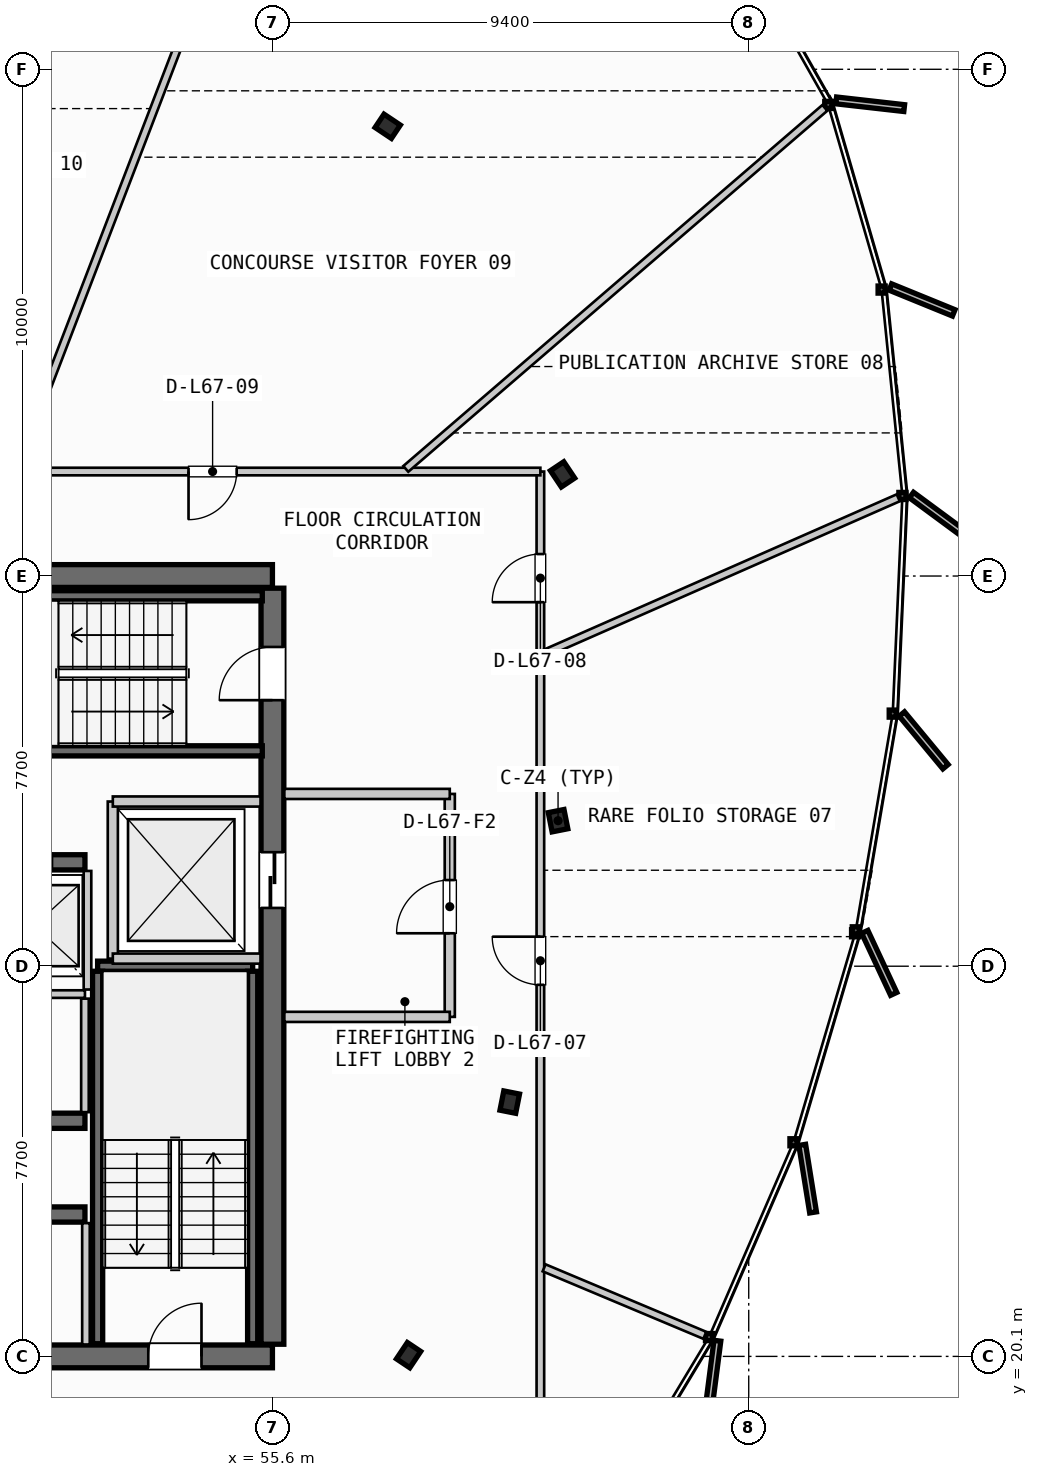
"""IFC4 building model, lengths in metres.
Left out: names, types, materials, properties, quantities, classifications, styles, units other than length and angle.
Written with IfcOpenShell. Run it as: python <this file> out.ifc"""

import sys

from ifc_helpers import new_model, si_unit, direction, frame, frame_2d, origin, origin_2d, place, context, subcontext, project, spatial, rectangle, i_section, extrude, source, transform, mapped, element, fill, save


model = new_model("IFC4")
c1 = context("Model", 3, precision=1e-05, world=origin(), true_north=direction((0.0, 1.0)))
c2 = subcontext(c1, "Body", "Model", "MODEL_VIEW")
j1 = project(units=[si_unit("LENGTHUNIT", "METRE"), si_unit("PLANEANGLEUNIT", "RADIAN")], contexts=[c1])
p1 = place(None, origin())
s1 = spatial("IfcSite", under=j1, at=p1, CompositionType="ELEMENT")
p2 = place(p1, origin())
s2 = spatial("IfcBuilding", under=s1, at=p2, CompositionType="ELEMENT")
p3 = place(p2, frame((0.0, 0.0, 256.0)))
s3 = spatial("IfcBuildingStorey", under=s2, at=p3, CompositionType="ELEMENT", Elevation=256.0)
p4 = place(p3, frame((38.0, 20.1, 0.0), z_axis=(0.0, 0.0, 1.0), x_axis=(1.0, 0.0, 0.0)))
e1 = element("IfcWall", 1, at=p4, inside=s3, PredefinedType="SHEAR", context=c2, shape_type="SweptSolid", body=[
    extrude(rectangle(XDim=17.6, YDim=0.45, at=frame_2d((8.8, 0.0))), origin(), (0.0, 0.0, 1.0), 3.21),
])
p5 = place(p4, frame((1.4, 0.0, 0.0)))
e2 = element("IfcOpeningElement", 2, at=p5, cuts=e1, PredefinedType="OPENING", context=c2, shape_type="SweptSolid", body=[
    extrude(rectangle(XDim=1.05, YDim=2.15, at=frame_2d((0.525, 1.075))), frame((0.0, 0.235, 0.0), z_axis=(0.0, -1.0, 0.0), x_axis=(1.0, 0.0, 0.0)), (0.0, 0.0, 1.0), 0.47),
])
p6 = place(p4, frame((15.15, 0.0, 0.0)))
e3 = element("IfcOpeningElement", 3, at=p6, cuts=e1, PredefinedType="OPENING", context=c2, shape_type="SweptSolid", body=[
    extrude(rectangle(XDim=1.05, YDim=2.15, at=frame_2d((0.525, 1.075))), frame((0.0, 0.235, 0.0), z_axis=(0.0, -1.0, 0.0), x_axis=(1.0, 0.0, 0.0)), (0.0, 0.0, 1.0), 0.47),
])
p7 = place(p4, frame((5.25, 0.0, 0.0)))
e4 = element("IfcOpeningElement", 4, at=p7, cuts=e1, PredefinedType="OPENING", context=c2, shape_type="SweptSolid", body=[
    extrude(rectangle(XDim=0.95, YDim=2.15, at=frame_2d((0.475, 1.075))), frame((0.0, 0.235, 0.0), z_axis=(0.0, -1.0, 0.0), x_axis=(1.0, 0.0, 0.0)), (0.0, 0.0, 1.0), 0.47),
])
p8 = place(p4, frame((11.4, 0.0, 0.0)))
e5 = element("IfcOpeningElement", 5, at=p8, cuts=e1, PredefinedType="OPENING", context=c2, shape_type="SweptSolid", body=[
    extrude(rectangle(XDim=0.95, YDim=2.15, at=frame_2d((0.475, 1.075))), frame((0.0, 0.235, 0.0), z_axis=(0.0, -1.0, 0.0), x_axis=(1.0, 0.0, 0.0)), (0.0, 0.0, 1.0), 0.47),
])
p9 = place(p3, frame((55.6, 35.5, 0.0), z_axis=(0.0, 0.0, 1.0), x_axis=(-1.0, 0.0, 0.0)))
e6 = element("IfcWall", 6, at=p9, inside=s3, PredefinedType="SHEAR", context=c2, shape_type="SweptSolid", body=[
    extrude(rectangle(XDim=17.6, YDim=0.45, at=frame_2d((8.8, 0.0))), origin(), (0.0, 0.0, 1.0), 3.21),
])
p10 = place(p9, frame((8.05, 0.0, 0.0)))
e7 = element("IfcOpeningElement", 7, at=p10, cuts=e6, PredefinedType="OPENING", context=c2, shape_type="SweptSolid", body=[
    extrude(rectangle(XDim=1.5, YDim=2.2, at=frame_2d((0.75, 1.1))), frame((0.0, 0.235, 0.0), z_axis=(0.0, -1.0, 0.0), x_axis=(1.0, 0.0, 0.0)), (0.0, 0.0, 1.0), 0.47),
])
p11 = place(p9, frame((15.85, 0.0, 0.0)))
e8 = element("IfcOpeningElement", 8, at=p11, cuts=e6, PredefinedType="OPENING", context=c2, shape_type="SweptSolid", body=[
    extrude(rectangle(XDim=0.85, YDim=2.15, at=frame_2d((0.425, 1.075))), frame((0.0, 0.235, 0.0), z_axis=(0.0, -1.0, 0.0), x_axis=(1.0, 0.0, 0.0)), (0.0, 0.0, 1.0), 0.47),
])
p12 = place(p9, frame((14.35, 0.0, 0.0)))
e9 = element("IfcOpeningElement", 9, at=p12, cuts=e6, PredefinedType="OPENING", context=c2, shape_type="SweptSolid", body=[
    extrude(rectangle(XDim=0.85, YDim=2.15, at=frame_2d((0.425, 1.075))), frame((0.0, 0.235, 0.0), z_axis=(0.0, -1.0, 0.0), x_axis=(1.0, 0.0, 0.0)), (0.0, 0.0, 1.0), 0.47),
])
p13 = place(p9, frame((12.3, 0.0, 0.0)))
e10 = element("IfcOpeningElement", 10, at=p13, cuts=e6, PredefinedType="OPENING", context=c2, shape_type="SweptSolid", body=[
    extrude(rectangle(XDim=0.95, YDim=2.15, at=frame_2d((0.475, 1.075))), frame((0.0, 0.235, 0.0), z_axis=(0.0, -1.0, 0.0), x_axis=(1.0, 0.0, 0.0)), (0.0, 0.0, 1.0), 0.47),
])
p14 = place(p9, frame((10.2, 0.0, 0.0)))
e11 = element("IfcOpeningElement", 11, at=p14, cuts=e6, PredefinedType="OPENING", context=c2, shape_type="SweptSolid", body=[
    extrude(rectangle(XDim=0.9, YDim=2.15, at=frame_2d((0.45, 1.075))), frame((0.0, 0.235, 0.0), z_axis=(0.0, -1.0, 0.0), x_axis=(1.0, 0.0, 0.0)), (0.0, 0.0, 1.0), 0.47),
])
p15 = place(p3, frame((55.6, 20.34, 0.0), z_axis=(0.0, 0.0, 1.0), x_axis=(0.0, 1.0, 0.0)))
e12 = element("IfcWall", 12, at=p15, inside=s3, PredefinedType="SHEAR", context=c2, shape_type="SweptSolid", body=[
    extrude(rectangle(XDim=14.92, YDim=0.45, at=frame_2d((7.46, 0.0))), origin(), (0.0, 0.0, 1.0), 3.21),
])
p16 = place(p15, frame((12.71, 0.0, 0.0)))
e13 = element("IfcOpeningElement", 13, at=p16, cuts=e12, PredefinedType="OPENING", context=c2, shape_type="SweptSolid", body=[
    extrude(rectangle(XDim=1.05, YDim=2.15, at=frame_2d((0.525, 1.075))), frame((0.0, 0.235, 0.0), z_axis=(0.0, -1.0, 0.0), x_axis=(1.0, 0.0, 0.0)), (0.0, 0.0, 1.0), 0.47),
])
p17 = place(p15, frame((8.61, 0.0, 0.0)))
e14 = element("IfcOpeningElement", 14, at=p17, cuts=e12, PredefinedType="OPENING", context=c2, shape_type="SweptSolid", body=[
    extrude(rectangle(XDim=1.1, YDim=2.2, at=frame_2d((0.55, 1.1))), frame((0.0, 0.235, 0.0), z_axis=(0.0, -1.0, 0.0), x_axis=(1.0, 0.0, 0.0)), (0.0, 0.0, 1.0), 0.47),
])
p18 = place(p3, frame((47.65, 22.9, 0.0), z_axis=(0.0, 0.0, 1.0), x_axis=(1.0, 0.0, 0.0)))
e15 = element("IfcWall", 15, at=p18, inside=s3, PredefinedType="SHEAR", context=c2, shape_type="SweptSolid", body=[
    extrude(rectangle(XDim=4.25, YDim=0.3, at=frame_2d((2.125, 0.0))), origin(), (0.0, 0.0, 1.0), 3.21),
])
p19 = place(p3, frame((47.65, 24.75, 0.0), z_axis=(0.0, 0.0, 1.0), x_axis=(1.0, 0.0, 0.0)))
e16 = element("IfcWall", 16, at=p19, inside=s3, PredefinedType="SHEAR", context=c2, shape_type="SweptSolid", body=[
    extrude(rectangle(XDim=4.25, YDim=0.3, at=frame_2d((2.125, 0.0))), origin(), (0.0, 0.0, 1.0), 3.21),
])
p20 = place(p19, frame((1.55, 0.0, 0.0)))
e17 = element("IfcOpeningElement", 17, at=p20, cuts=e16, PredefinedType="OPENING", context=c2, shape_type="SweptSolid", body=[
    extrude(rectangle(XDim=0.95, YDim=2.15, at=frame_2d((0.475, 1.075))), frame((0.0, 0.16, 0.0), z_axis=(0.0, -1.0, 0.0), x_axis=(1.0, 0.0, 0.0)), (0.0, 0.0, 1.0), 0.32),
])
p21 = place(p3, frame((47.65, 29.85, 0.0), z_axis=(0.0, 0.0, 1.0), x_axis=(1.0, 0.0, 0.0)))
e18 = element("IfcWall", 18, at=p21, inside=s3, PredefinedType="SHEAR", context=c2, shape_type="SweptSolid", body=[
    extrude(rectangle(XDim=4.25, YDim=0.3, at=frame_2d((2.125, 0.0))), origin(), (0.0, 0.0, 1.0), 3.21),
])
p22 = place(p21, frame((0.45, 0.0, 0.0)))
e19 = element("IfcOpeningElement", 19, at=p22, cuts=e18, PredefinedType="OPENING", context=c2, shape_type="SweptSolid", body=[
    extrude(rectangle(XDim=1.1, YDim=2.2, at=frame_2d((0.55, 1.1))), frame((0.0, 0.16, 0.0), z_axis=(0.0, -1.0, 0.0), x_axis=(1.0, 0.0, 0.0)), (0.0, 0.0, 1.0), 0.32),
])
p23 = place(p21, frame((2.5, 0.0, 0.0)))
e20 = element("IfcOpeningElement", 20, at=p23, cuts=e18, PredefinedType="OPENING", context=c2, shape_type="SweptSolid", body=[
    extrude(rectangle(XDim=1.1, YDim=2.2, at=frame_2d((0.55, 1.1))), frame((0.0, 0.16, 0.0), z_axis=(0.0, -1.0, 0.0), x_axis=(1.0, 0.0, 0.0)), (0.0, 0.0, 1.0), 0.32),
])
m1 = source(origin(), c2, "Body", "SweptSolid", [
    extrude(i_section(OverallWidth=0.387, OverallDepth=0.316, WebThickness=0.019, FlangeThickness=0.028, FilletRadius=0.015, at=origin_2d()), origin(), (0.0, 0.0, 1.0), 3.21),
])
for number, where, z_axis, x_axis in (
    (21, (61.237, 30.672, 0.0), (0.0, 0.0, 1.0), (0.981, 0.195, 0.0)),
    (22, (61.326, 37.506, 0.0), (0.0, 0.0, 1.0), (0.831, 0.556, 0.0)),
    (23, (57.875, 44.375, 0.0), (0.0, 0.0, 1.0), (0.556, 0.831, 0.0)),
    (24, (58.287, 20.125, 0.0), (0.0, 0.0, 1.0), (0.831, -0.556, 0.0)),
    (25, (60.284, 25.118, 0.0), (0.0, 0.0, 1.0), (0.981, -0.195, 0.0)),
):
    element("IfcColumn", number, at=place(p3, frame(where, z_axis=z_axis, x_axis=x_axis)), inside=s3, PredefinedType="COLUMN", context=c2, shape_type="MappedRepresentation", body=[
        mapped(m1, transform((0.0, 0.0, 0.0), scale=1.0)),
    ])
p24 = place(p3, frame((52.15, 27.8, 0.0), z_axis=(0.0, 0.0, 1.0), x_axis=(1.0, 0.0, 0.0)))
e26 = element("IfcWall", 26, at=p24, inside=s3, PredefinedType="SHEAR", context=c2, shape_type="SweptSolid", body=[
    extrude(rectangle(XDim=3.06, YDim=0.2, at=frame_2d((1.53, 0.0))), origin(), (0.0, 0.0, 1.0), 3.21),
])
for number, where, z_axis, x_axis in (
    (27, (55.21, 27.7, 0.0), (0.0, 0.0, 1.0), (0.0, -1.0, 0.0)),
    (28, (52.15, 20.35, 0.0), (0.0, 0.0, 1.0), (0.0, 1.0, 0.0)),
    (29, (48.05, 35.11, 0.0), (0.0, 0.0, 1.0), (1.0, 0.0, 0.0)),
    (30, (55.4, 32.05, 0.0), (0.0, 0.0, 1.0), (-1.0, 0.0, 0.0)),
):
    element("IfcWall", number, at=place(p3, frame(where, z_axis=z_axis, x_axis=x_axis)), inside=s3, PredefinedType="SHEAR", context=c2, shape_type="SweptSolid", body=[
        extrude(rectangle(XDim=7.35, YDim=0.2, at=frame_2d((3.675, 0.0))), origin(), (0.0, 0.0, 1.0), 3.21),
    ])
p25 = place(p3, frame((52.45, 27.95, 0.0), z_axis=(0.0, 0.0, 1.0), x_axis=(0.0, 1.0, 0.0)))
e31 = element("IfcWall", 31, at=p25, inside=s3, PredefinedType="PARTITIONING", context=c2, shape_type="SweptSolid", body=[
    extrude(rectangle(XDim=3.1, YDim=0.2, at=frame_2d((1.55, 0.0))), origin(), (0.0, 0.0, 1.0), 2.28),
])
for number, where, z_axis, x_axis in (
    (32, (52.45, 27.95, 0.0), (0.0, 0.0, 1.0), (1.0, 0.0, 0.0)),
    (33, (52.45, 31.05, 0.0), (0.0, 0.0, 1.0), (1.0, 0.0, 0.0)),
):
    element("IfcWall", number, at=place(p3, frame(where, z_axis=z_axis, x_axis=x_axis)), inside=s3, PredefinedType="PARTITIONING", context=c2, shape_type="SweptSolid", body=[
        extrude(rectangle(XDim=2.915, YDim=0.2, at=frame_2d((1.458, 0.0))), origin(), (0.0, 0.0, 1.0), 2.28),
    ])
p26 = place(p3, frame((59.1, 26.8, 0.0), z_axis=(0.0, 0.0, 1.0), x_axis=(0.0, 1.0, 0.0)))
e34 = element("IfcWall", 34, at=p26, inside=s3, PredefinedType="PARTITIONING", context=c2, shape_type="SweptSolid", body=[
    extrude(rectangle(XDim=4.4, YDim=0.2, at=frame_2d((2.2, 0.0))), origin(), (0.0, 0.0, 1.0), 2.28),
])
p27 = place(p26, frame((1.65, 0.0, 0.0)))
e35 = element("IfcOpeningElement", 35, at=p27, cuts=e34, PredefinedType="OPENING", context=c2, shape_type="SweptSolid", body=[
    extrude(rectangle(XDim=1.05, YDim=2.15, at=frame_2d((0.525, 1.075))), frame((0.0, 0.11, 0.0), z_axis=(0.0, -1.0, 0.0), x_axis=(1.0, 0.0, 0.0)), (0.0, 0.0, 1.0), 0.22),
])
for number, where, z_axis, x_axis in (
    (36, (55.835, 26.8, 0.0), (0.0, 0.0, 1.0), (1.0, 0.0, 0.0)),
    (37, (55.835, 31.2, 0.0), (0.0, 0.0, 1.0), (1.0, 0.0, 0.0)),
):
    element("IfcWall", number, at=place(p3, frame(where, z_axis=z_axis, x_axis=x_axis)), inside=s3, PredefinedType="PARTITIONING", context=c2, shape_type="SweptSolid", body=[
        extrude(rectangle(XDim=3.265, YDim=0.2, at=frame_2d((1.633, 0.0))), origin(), (0.0, 0.0, 1.0), 2.28),
    ])
p28 = place(p3, frame((51.92, 20.335, 0.0), z_axis=(0.0, 0.0, 1.0), x_axis=(0.0, 1.0, 0.0)))
e38 = element("IfcWall", 38, at=p28, inside=s3, PredefinedType="PARTITIONING", context=c2, shape_type="SweptSolid", body=[
    extrude(rectangle(XDim=2.395, YDim=0.15, at=frame_2d((1.198, 0.0))), origin(), (0.0, 0.0, 1.0), 2.28),
])
p29 = place(p3, frame((47.65, 27.25, 0.0), z_axis=(0.0, 0.0, 1.0), x_axis=(1.0, 0.0, 0.0)))
e39 = element("IfcWall", 39, at=p29, inside=s3, PredefinedType="PARTITIONING", context=c2, shape_type="SweptSolid", body=[
    extrude(rectangle(XDim=4.25, YDim=0.15, at=frame_2d((2.125, 0.0))), origin(), (0.0, 0.0, 1.0), 2.28),
])
p30 = place(p3, frame((51.9, 24.92, 0.0), z_axis=(0.0, 0.0, 1.0), x_axis=(0.0, 1.0, 0.0)))
e40 = element("IfcWall", 40, at=p30, inside=s3, PredefinedType="PARTITIONING", context=c2, shape_type="SweptSolid", body=[
    extrude(rectangle(XDim=2.24, YDim=0.15, at=frame_2d((1.12, 0.0))), origin(), (0.0, 0.0, 1.0), 2.28),
])
p31 = place(p3, frame((51.95, 27.34, 0.0), z_axis=(0.0, 0.0, 1.0), x_axis=(0.0, 1.0, 0.0)))
e41 = element("IfcWall", 41, at=p31, inside=s3, PredefinedType="PARTITIONING", context=c2, shape_type="SweptSolid", body=[
    extrude(rectangle(XDim=2.34, YDim=0.15, at=frame_2d((1.17, 0.0))), origin(), (0.0, 0.0, 1.0), 2.28),
])
p32 = place(p3, frame((60.888, 18.269, 0.0), z_axis=(0.0, 0.0, 1.0), x_axis=(0.0, 1.0, 0.0)))
e42 = element("IfcWall", 42, at=p32, inside=s3, PredefinedType="PARTITIONING", context=c2, shape_type="SweptSolid", body=[
    extrude(rectangle(XDim=19.293, YDim=0.15, at=frame_2d((9.646, 0.0))), origin(), (0.0, 0.0, 1.0), 2.28),
])
p33 = place(p32, frame((9.164, 0.0, 0.0)))
e43 = element("IfcOpeningElement", 43, at=p33, cuts=e42, PredefinedType="OPENING", context=c2, shape_type="SweptSolid", body=[
    extrude(rectangle(XDim=0.95, YDim=2.15, at=frame_2d((0.475, 1.075))), frame((0.0, 0.085, 0.0), z_axis=(0.0, -1.0, 0.0), x_axis=(1.0, 0.0, 0.0)), (0.0, 0.0, 1.0), 0.17),
])
p34 = place(p32, frame((16.715, 0.0, 0.0)))
e44 = element("IfcOpeningElement", 44, at=p34, cuts=e42, PredefinedType="OPENING", context=c2, shape_type="SweptSolid", body=[
    extrude(rectangle(XDim=0.95, YDim=2.15, at=frame_2d((0.475, 1.075))), frame((0.0, 0.085, 0.0), z_axis=(0.0, -1.0, 0.0), x_axis=(1.0, 0.0, 0.0)), (0.0, 0.0, 1.0), 0.17),
])
p35 = place(p3, frame((60.888, 37.562, 0.0), z_axis=(0.0, 0.0, 1.0), x_axis=(-1.0, 0.0, 0.0)))
e45 = element("IfcWall", 45, at=p35, inside=s3, PredefinedType="PARTITIONING", context=c2, shape_type="SweptSolid", body=[
    extrude(rectangle(XDim=28.038, YDim=0.15, at=frame_2d((14.019, 0.0))), origin(), (0.0, 0.0, 1.0), 2.28),
])
p36 = place(p35, frame((5.994, 0.0, 0.0)))
e46 = element("IfcOpeningElement", 46, at=p36, cuts=e45, PredefinedType="OPENING", context=c2, shape_type="SweptSolid", body=[
    extrude(rectangle(XDim=0.95, YDim=2.15, at=frame_2d((0.475, 1.075))), frame((0.0, 0.085, 0.0), z_axis=(0.0, -1.0, 0.0), x_axis=(1.0, 0.0, 0.0)), (0.0, 0.0, 1.0), 0.17),
])
p37 = place(p35, frame((12.306, 0.0, 0.0)))
e47 = element("IfcOpeningElement", 47, at=p37, cuts=e45, PredefinedType="OPENING", context=c2, shape_type="SweptSolid", body=[
    extrude(rectangle(XDim=0.95, YDim=2.15, at=frame_2d((0.475, 1.075))), frame((0.0, 0.085, 0.0), z_axis=(0.0, -1.0, 0.0), x_axis=(1.0, 0.0, 0.0)), (0.0, 0.0, 1.0), 0.17),
])
p38 = place(p35, frame((20.858, 0.0, 0.0)))
e48 = element("IfcOpeningElement", 48, at=p38, cuts=e45, PredefinedType="OPENING", context=c2, shape_type="SweptSolid", body=[
    extrude(rectangle(XDim=0.95, YDim=2.15, at=frame_2d((0.475, 1.075))), frame((0.0, 0.085, 0.0), z_axis=(0.0, -1.0, 0.0), x_axis=(1.0, 0.0, 0.0)), (0.0, 0.0, 1.0), 0.17),
])
p39 = place(p3, frame((60.962, 21.848, 0.0), z_axis=(0.0, 0.0, 1.0), x_axis=(0.921987679929, -0.387219211892, 0.0)))
e49 = element("IfcWall", 49, at=p39, inside=s3, PredefinedType="PARTITIONING", context=c2, shape_type="SweptSolid", body=[
    extrude(rectangle(XDim=3.44, YDim=0.15, at=frame_2d((1.72, 0.0))), origin(), (0.0, 0.0, 1.0), 2.28),
])
p40 = place(p3, frame((60.961, 33.967, 0.0), z_axis=(0.0, 0.0, 1.0), x_axis=(0.915265056404, 0.402852177015, 0.0)))
e50 = element("IfcWall", 50, at=p40, inside=s3, PredefinedType="PARTITIONING", context=c2, shape_type="SweptSolid", body=[
    extrude(rectangle(XDim=7.636, YDim=0.15, at=frame_2d((3.818, 0.0))), origin(), (0.0, 0.0, 1.0), 2.28),
])
p41 = place(p3, frame((58.232, 37.614, 0.0), z_axis=(0.0, 0.0, 1.0), x_axis=(0.757629619608, 0.652684732081, 0.0)))
e51 = element("IfcWall", 51, at=p41, inside=s3, PredefinedType="PARTITIONING", context=c2, shape_type="SweptSolid", body=[
    extrude(rectangle(XDim=10.915, YDim=0.15, at=frame_2d((5.458, 0.0))), origin(), (0.0, 0.0, 1.0), 2.28),
])
p42 = place(p3, frame((50.546, 37.637, 0.0), z_axis=(0.0, 0.0, 1.0), x_axis=(0.35830718527, 0.933603749448, 0.0)))
e52 = element("IfcWall", 52, at=p42, inside=s3, PredefinedType="PARTITIONING", context=c2, shape_type="SweptSolid", body=[
    extrude(rectangle(XDim=15.464, YDim=0.15, at=frame_2d((7.732, 0.0))), origin(), (0.0, 0.0, 1.0), 2.28),
])
m2 = source(origin(), c2, "Body", "SweptSolid", [
    extrude(rectangle(XDim=1.05, YDim=2.15, at=frame_2d((0.525, 1.075))), frame((0.0, 0.025, 0.0), z_axis=(0.0, -1.0, 0.0), x_axis=(1.0, 0.0, 0.0)), (0.0, 0.0, 1.0), 0.05),
])
p43 = place(p6, origin())
e53 = element("IfcDoor", 53, at=p43, inside=s3, OperationType="SINGLE_SWING_RIGHT", PredefinedType="DOOR", context=c2, shape_type="MappedRepresentation", body=[
    mapped(m2, transform((0.0, 0.0, 0.0), scale=1.0)),
])
fill(e3, e53)
p44 = place(p16, origin())
e54 = element("IfcDoor", 54, at=p44, inside=s3, OperationType="SINGLE_SWING_LEFT", PredefinedType="DOOR", context=c2, shape_type="MappedRepresentation", body=[
    mapped(m2, transform((0.0, 0.0, 0.0), scale=1.0)),
])
fill(e13, e54)
m3 = source(origin(), c2, "Body", "SweptSolid", [
    extrude(rectangle(XDim=1.1, YDim=2.2, at=frame_2d((0.55, 1.1))), frame((0.0, 0.025, 0.0), z_axis=(0.0, -1.0, 0.0), x_axis=(1.0, 0.0, 0.0)), (0.0, 0.0, 1.0), 0.05),
])
p45 = place(p17, origin())
e55 = element("IfcDoor", 55, at=p45, inside=s3, OperationType="SLIDING_TO_RIGHT", PredefinedType="DOOR", context=c2, shape_type="MappedRepresentation", body=[
    mapped(m3, transform((0.0, 0.0, 0.0), scale=1.0)),
])
fill(e14, e55)
p46 = place(p27, origin())
e56 = element("IfcDoor", 56, at=p46, inside=s3, OperationType="SINGLE_SWING_LEFT", PredefinedType="DOOR", context=c2, shape_type="MappedRepresentation", body=[
    mapped(m2, transform((0.0, 0.0, 0.0), scale=1.0)),
])
fill(e35, e56)
m4 = source(origin(), c2, "Body", "SweptSolid", [
    extrude(rectangle(XDim=0.95, YDim=2.15, at=frame_2d((0.475, 1.075))), frame((0.0, 0.025, 0.0), z_axis=(0.0, -1.0, 0.0), x_axis=(1.0, 0.0, 0.0)), (0.0, 0.0, 1.0), 0.05),
])
p47 = place(p33, origin())
e57 = element("IfcDoor", 57, at=p47, inside=s3, OperationType="SINGLE_SWING_RIGHT", PredefinedType="DOOR", context=c2, shape_type="MappedRepresentation", body=[
    mapped(m4, transform((0.0, 0.0, 0.0), scale=1.0)),
])
fill(e43, e57)
p48 = place(p34, origin())
e58 = element("IfcDoor", 58, at=p48, inside=s3, OperationType="SINGLE_SWING_LEFT", PredefinedType="DOOR", context=c2, shape_type="MappedRepresentation", body=[
    mapped(m4, transform((0.0, 0.0, 0.0), scale=1.0)),
])
fill(e44, e58)
p49 = place(p36, origin())
e59 = element("IfcDoor", 59, at=p49, inside=s3, OperationType="SINGLE_SWING_RIGHT", PredefinedType="DOOR", context=c2, shape_type="MappedRepresentation", body=[
    mapped(m4, transform((0.0, 0.0, 0.0), scale=1.0)),
])
fill(e46, e59)
save(model, sys.argv[1])
